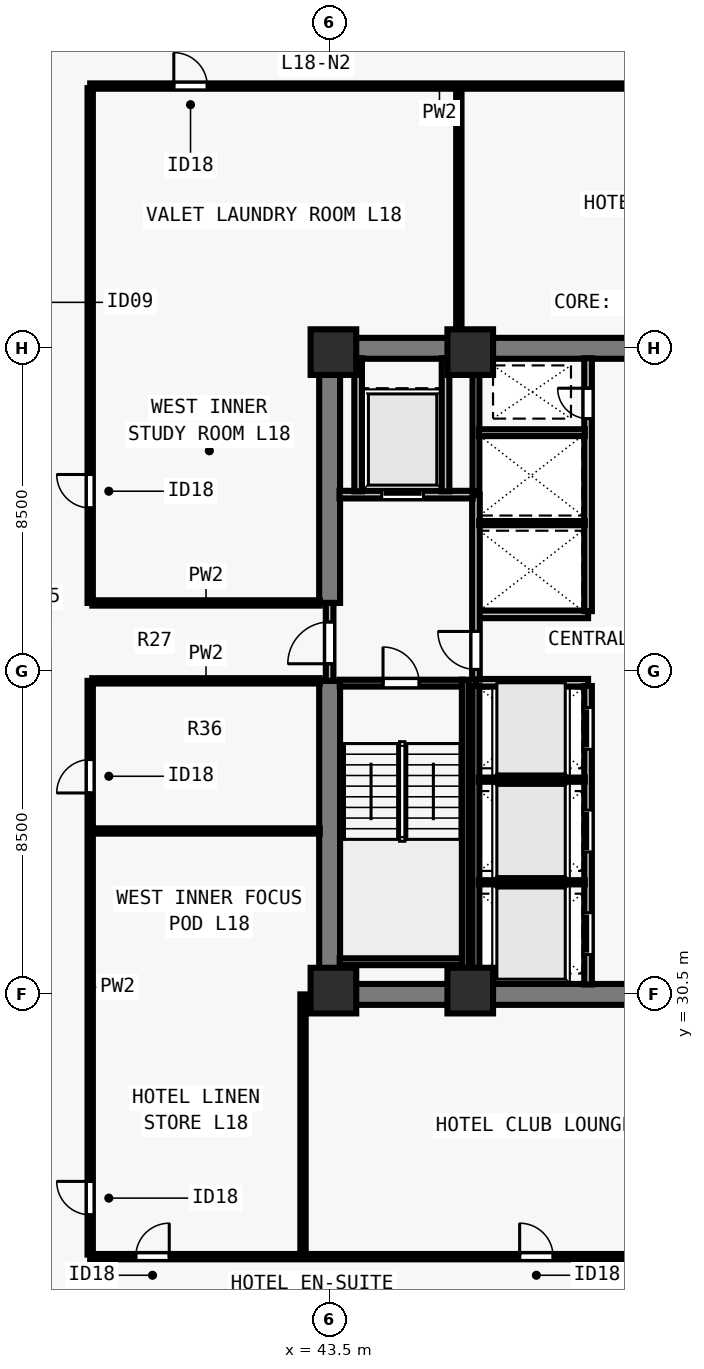
"""IFC4 building model, lengths in metres.
Left out: names, types, materials, properties, quantities, classifications, styles, units other than length and angle.
Written with IfcOpenShell. Run it as: python <this file> out.ifc"""

import sys

from ifc_helpers import new_model, si_unit, direction, frame, frame_2d, origin, origin_2d, place, context, subcontext, project, spatial, rectangle, extrude, element, fill, save


model = new_model("IFC4")
c1 = context("Model", 3, precision=1e-05, world=origin(), true_north=direction((0.0, 1.0)))
c2 = subcontext(c1, "Body", "Model", "MODEL_VIEW")
j1 = project(units=[si_unit("LENGTHUNIT", "METRE"), si_unit("PLANEANGLEUNIT", "RADIAN")], contexts=[c1])
p1 = place(None, origin())
s1 = spatial("IfcSite", under=j1, at=p1, CompositionType="ELEMENT")
p2 = place(p1, origin())
s2 = spatial("IfcBuilding", under=s1, at=p2, CompositionType="ELEMENT")
p3 = place(p2, frame((0.0, 0.0, 69.0)))
s3 = spatial("IfcBuildingStorey", under=s2, at=p3, CompositionType="ELEMENT", Elevation=69.0)
for number, where, z_axis, x_axis in (
    (1, (43.6, 30.6, 0.0), (0.0, 0.0, 1.0), (1.0, 0.0, 0.0)),
    (2, (47.2, 30.6, 0.0), (0.0, 0.0, 1.0), (1.0, 0.0, 0.0)),
    (3, (43.6, 47.4, 0.0), (0.0, 0.0, 1.0), (1.0, 0.0, 0.0)),
    (4, (47.2, 47.4, 0.0), (0.0, 0.0, 1.0), (1.0, 0.0, 0.0)),
):
    element("IfcColumn", number, at=place(p3, frame(where, z_axis=z_axis, x_axis=x_axis)), inside=s3, PredefinedType="COLUMN", context=c2, shape_type="SweptSolid", body=[
        extrude(rectangle(XDim=1.2, YDim=1.2, at=origin_2d()), origin(), (0.0, 0.0, 1.0), 3.5),
    ])
for number, where, z_axis, x_axis in (
    (5, (43.225, 30.5, 0.0), (0.0, 0.0, 1.0), (1.0, 0.0, 0.0)),
    (6, (43.225, 47.5, 0.0), (0.0, 0.0, 1.0), (1.0, 0.0, 0.0)),
):
    element("IfcWall", number, at=place(p3, frame(where, z_axis=z_axis, x_axis=x_axis)), inside=s3, PredefinedType="SHEAR", context=c2, shape_type="SweptSolid", body=[
        extrude(rectangle(XDim=17.55, YDim=0.55, at=frame_2d((8.775, 0.0))), origin(), (0.0, 0.0, 1.0), 3.28),
    ])
p4 = place(p3, frame((43.5, 30.765, 0.0), z_axis=(0.0, 0.0, 1.0), x_axis=(0.0, 1.0, 0.0)))
e7 = element("IfcWall", 7, at=p4, inside=s3, PredefinedType="SHEAR", context=c2, shape_type="SweptSolid", body=[
    extrude(rectangle(XDim=7.985, YDim=0.55, at=frame_2d((3.993, 0.0))), origin(), (0.0, 0.0, 1.0), 3.28),
])
p5 = place(p3, frame((43.5, 40.8, 0.0), z_axis=(0.0, 0.0, 1.0), x_axis=(0.0, 1.0, 0.0)))
e8 = element("IfcWall", 8, at=p5, inside=s3, PredefinedType="SHEAR", context=c2, shape_type="SweptSolid", body=[
    extrude(rectangle(XDim=6.435, YDim=0.55, at=frame_2d((3.218, 0.0))), origin(), (0.0, 0.0, 1.0), 3.28),
])
for number, where, z_axis, x_axis in (
    (9, (47.35, 38.7, 0.0), (0.0, 0.0, 1.0), (1.0, 0.0, 0.0)),
    (10, (47.35, 40.5, 0.0), (0.0, 0.0, 1.0), (1.0, 0.0, 0.0)),
):
    element("IfcWall", number, at=place(p3, frame(where, z_axis=z_axis, x_axis=x_axis)), inside=s3, PredefinedType="SOLIDWALL", context=c2, shape_type="SweptSolid", body=[
        extrude(rectangle(XDim=2.95, YDim=0.2, at=frame_2d((1.475, 0.0))), origin(), (0.0, 0.0, 1.0), 3.28),
    ])
p6 = place(p3, frame((50.3, 30.76, 0.0), z_axis=(0.0, 0.0, 1.0), x_axis=(0.0, 1.0, 0.0)))
e11 = element("IfcWall", 11, at=p6, inside=s3, PredefinedType="SOLIDWALL", context=c2, shape_type="SweptSolid", body=[
    extrude(rectangle(XDim=7.855, YDim=0.2, at=frame_2d((3.927, 0.0))), origin(), (0.0, 0.0, 1.0), 3.28),
])
p7 = place(p6, frame((0.79, 0.0, 0.0)))
e12 = element("IfcOpeningElement", 12, at=p7, cuts=e11, PredefinedType="OPENING", context=c2, shape_type="SweptSolid", body=[
    extrude(rectangle(XDim=1.1, YDim=2.2, at=frame_2d((0.55, 1.1))), frame((0.0, 0.11, 0.0), z_axis=(0.0, -1.0, 0.0), x_axis=(1.0, 0.0, 0.0)), (0.0, 0.0, 1.0), 0.22),
])
p8 = place(p6, frame((3.49, 0.0, 0.0)))
e13 = element("IfcOpeningElement", 13, at=p8, cuts=e11, PredefinedType="OPENING", context=c2, shape_type="SweptSolid", body=[
    extrude(rectangle(XDim=1.1, YDim=2.2, at=frame_2d((0.55, 1.1))), frame((0.0, 0.11, 0.0), z_axis=(0.0, -1.0, 0.0), x_axis=(1.0, 0.0, 0.0)), (0.0, 0.0, 1.0), 0.22),
])
p9 = place(p6, frame((6.19, 0.0, 0.0)))
e14 = element("IfcOpeningElement", 14, at=p9, cuts=e11, PredefinedType="OPENING", context=c2, shape_type="SweptSolid", body=[
    extrude(rectangle(XDim=1.1, YDim=2.2, at=frame_2d((0.55, 1.1))), frame((0.0, 0.11, 0.0), z_axis=(0.0, -1.0, 0.0), x_axis=(1.0, 0.0, 0.0)), (0.0, 0.0, 1.0), 0.22),
])
p10 = place(p3, frame((50.3, 40.585, 0.0), z_axis=(0.0, 0.0, 1.0), x_axis=(0.0, 1.0, 0.0)))
e15 = element("IfcWall", 15, at=p10, inside=s3, PredefinedType="SOLIDWALL", context=c2, shape_type="SweptSolid", body=[
    extrude(rectangle(XDim=6.655, YDim=0.2, at=frame_2d((3.328, 0.0))), origin(), (0.0, 0.0, 1.0), 3.28),
])
p11 = place(p10, frame((5.065, 0.0, 0.0)))
e16 = element("IfcOpeningElement", 16, at=p11, cuts=e15, PredefinedType="OPENING", context=c2, shape_type="SweptSolid", body=[
    extrude(rectangle(XDim=0.8, YDim=2.08, at=frame_2d((0.4, 1.04))), frame((0.0, 0.11, 0.0), z_axis=(0.0, -1.0, 0.0), x_axis=(1.0, 0.0, 0.0)), (0.0, 0.0, 1.0), 0.22),
])
p12 = place(p3, frame((43.5, 38.75, 0.0), z_axis=(0.0, 0.0, 1.0), x_axis=(0.0, 1.0, 0.0)))
e17 = element("IfcWall", 17, at=p12, inside=s3, PredefinedType="SOLIDWALL", context=c2, shape_type="SweptSolid", body=[
    extrude(rectangle(XDim=2.05, YDim=0.2, at=frame_2d((1.025, 0.0))), origin(), (0.0, 0.0, 1.0), 3.28),
])
p13 = place(p12, frame((0.45, 0.0, 0.0)))
e18 = element("IfcOpeningElement", 18, at=p13, cuts=e17, PredefinedType="OPENING", context=c2, shape_type="SweptSolid", body=[
    extrude(rectangle(XDim=1.1, YDim=2.15, at=frame_2d((0.55, 1.075))), frame((0.0, 0.11, 0.0), z_axis=(0.0, -1.0, 0.0), x_axis=(1.0, 0.0, 0.0)), (0.0, 0.0, 1.0), 0.22),
])
p14 = place(p3, frame((47.35, 38.785, 0.0), z_axis=(0.0, 0.0, 1.0), x_axis=(0.0, 1.0, 0.0)))
e19 = element("IfcWall", 19, at=p14, inside=s3, PredefinedType="SOLIDWALL", context=c2, shape_type="SweptSolid", body=[
    extrude(rectangle(XDim=4.865, YDim=0.2, at=frame_2d((2.433, 0.0))), origin(), (0.0, 0.0, 1.0), 3.28),
])
p15 = place(p14, frame((0.265, 0.0, 0.0)))
e20 = element("IfcOpeningElement", 20, at=p15, cuts=e19, PredefinedType="OPENING", context=c2, shape_type="SweptSolid", body=[
    extrude(rectangle(XDim=1.0, YDim=2.15, at=frame_2d((0.5, 1.075))), frame((0.0, 0.11, 0.0), z_axis=(0.0, -1.0, 0.0), x_axis=(1.0, 0.0, 0.0)), (0.0, 0.0, 1.0), 0.22),
])
p16 = place(p3, frame((43.76, 43.65, 0.0), z_axis=(0.0, 0.0, 1.0), x_axis=(1.0, 0.0, 0.0)))
e21 = element("IfcWall", 21, at=p16, inside=s3, PredefinedType="SOLIDWALL", context=c2, shape_type="SweptSolid", body=[
    extrude(rectangle(XDim=3.505, YDim=0.2, at=frame_2d((1.752, 0.0))), origin(), (0.0, 0.0, 1.0), 3.28),
])
p17 = place(p16, frame((1.11, 0.0, 0.0)))
e22 = element("IfcOpeningElement", 22, at=p17, cuts=e21, PredefinedType="OPENING", context=c2, shape_type="SweptSolid", body=[
    extrude(rectangle(XDim=1.1, YDim=2.2, at=frame_2d((0.55, 1.1))), frame((0.0, 0.11, 0.0), z_axis=(0.0, -1.0, 0.0), x_axis=(1.0, 0.0, 0.0)), (0.0, 0.0, 1.0), 0.22),
])
for number, where, z_axis, x_axis in (
    (23, (46.55, 43.735, 0.0), (0.0, 0.0, 1.0), (0.0, 1.0, 0.0)),
    (24, (44.25, 43.735, 0.0), (0.0, 0.0, 1.0), (0.0, 1.0, 0.0)),
):
    element("IfcWall", number, at=place(p3, frame(where, z_axis=z_axis, x_axis=x_axis)), inside=s3, PredefinedType="SOLIDWALL", context=c2, shape_type="SweptSolid", body=[
        extrude(rectangle(XDim=3.505, YDim=0.2, at=frame_2d((1.752, 0.0))), origin(), (0.0, 0.0, 1.0), 3.28),
    ])
p18 = place(p3, frame((47.35, 30.76, 0.0), z_axis=(0.0, 0.0, 1.0), x_axis=(0.0, 1.0, 0.0)))
e25 = element("IfcWall", 25, at=p18, inside=s3, PredefinedType="SOLIDWALL", context=c2, shape_type="SweptSolid", body=[
    extrude(rectangle(XDim=7.855, YDim=0.18, at=frame_2d((3.927, 0.0))), origin(), (0.0, 0.0, 1.0), 3.28),
])
for number, where, z_axis, x_axis in (
    (26, (47.425, 33.45, 0.0), (0.0, 0.0, 1.0), (1.0, 0.0, 0.0)),
    (27, (47.425, 36.15, 0.0), (0.0, 0.0, 1.0), (1.0, 0.0, 0.0)),
):
    element("IfcWall", number, at=place(p3, frame(where, z_axis=z_axis, x_axis=x_axis)), inside=s3, PredefinedType="PARTITIONING", context=c2, shape_type="SweptSolid", body=[
        extrude(rectangle(XDim=2.79, YDim=0.11, at=frame_2d((1.395, 0.0))), origin(), (0.0, 0.0, 1.0), 3.28),
    ])
p19 = place(p3, frame((47.35, 43.735, 0.0), z_axis=(0.0, 0.0, 1.0), x_axis=(0.0, 1.0, 0.0)))
e28 = element("IfcWall", 28, at=p19, inside=s3, PredefinedType="SOLIDWALL", context=c2, shape_type="SweptSolid", body=[
    extrude(rectangle(XDim=3.505, YDim=0.18, at=frame_2d((1.752, 0.0))), origin(), (0.0, 0.0, 1.0), 3.28),
])
p20 = place(p3, frame((47.435, 42.9, 0.0), z_axis=(0.0, 0.0, 1.0), x_axis=(1.0, 0.0, 0.0)))
e29 = element("IfcWall", 29, at=p20, inside=s3, PredefinedType="PARTITIONING", context=c2, shape_type="SweptSolid", body=[
    extrude(rectangle(XDim=2.78, YDim=0.11, at=frame_2d((1.39, 0.0))), origin(), (0.0, 0.0, 1.0), 3.28),
])
p21 = place(p3, frame((47.425, 45.28, 0.0), z_axis=(0.0, 0.0, 1.0), x_axis=(1.0, 0.0, 0.0)))
e30 = element("IfcWall", 30, at=p21, inside=s3, PredefinedType="SOLIDWALL", context=c2, shape_type="SweptSolid", body=[
    extrude(rectangle(XDim=2.79, YDim=0.18, at=frame_2d((1.395, 0.0))), origin(), (0.0, 0.0, 1.0), 3.28),
])
p22 = place(p3, frame((37.2, 23.6, 0.0), z_axis=(0.0, 0.0, 1.0), x_axis=(1.0, 0.0, 0.0)))
e31 = element("IfcWall", 31, at=p22, inside=s3, PredefinedType="PARTITIONING", context=c2, shape_type="SweptSolid", body=[
    extrude(rectangle(XDim=29.6, YDim=0.14, at=frame_2d((14.8, 0.0))), origin(), (0.0, 0.0, 1.0), 3.28),
])
p23 = place(p22, frame((1.2, 0.0, 0.0)))
e32 = element("IfcOpeningElement", 32, at=p23, cuts=e31, PredefinedType="OPENING", context=c2, shape_type="SweptSolid", body=[
    extrude(rectangle(XDim=0.88, YDim=2.1, at=frame_2d((0.44, 1.05))), frame((0.0, 0.08, 0.0), z_axis=(0.0, -1.0, 0.0), x_axis=(1.0, 0.0, 0.0)), (0.0, 0.0, 1.0), 0.16),
])
p24 = place(p22, frame((11.3, 0.0, 0.0)))
e33 = element("IfcOpeningElement", 33, at=p24, cuts=e31, PredefinedType="OPENING", context=c2, shape_type="SweptSolid", body=[
    extrude(rectangle(XDim=0.88, YDim=2.1, at=frame_2d((0.44, 1.05))), frame((0.0, 0.08, 0.0), z_axis=(0.0, -1.0, 0.0), x_axis=(1.0, 0.0, 0.0)), (0.0, 0.0, 1.0), 0.16),
])
p25 = place(p22, frame((21.8, 0.0, 0.0)))
e34 = element("IfcOpeningElement", 34, at=p25, cuts=e31, PredefinedType="OPENING", context=c2, shape_type="SweptSolid", body=[
    extrude(rectangle(XDim=0.88, YDim=2.1, at=frame_2d((0.44, 1.05))), frame((0.0, 0.08, 0.0), z_axis=(0.0, -1.0, 0.0), x_axis=(1.0, 0.0, 0.0)), (0.0, 0.0, 1.0), 0.16),
])
p26 = place(p3, frame((37.2, 54.4, 0.0), z_axis=(0.0, 0.0, 1.0), x_axis=(1.0, 0.0, 0.0)))
e35 = element("IfcWall", 35, at=p26, inside=s3, PredefinedType="PARTITIONING", context=c2, shape_type="SweptSolid", body=[
    extrude(rectangle(XDim=29.6, YDim=0.14, at=frame_2d((14.8, 0.0))), origin(), (0.0, 0.0, 1.0), 3.28),
])
p27 = place(p26, frame((2.2, 0.0, 0.0)))
e36 = element("IfcOpeningElement", 36, at=p27, cuts=e35, PredefinedType="OPENING", context=c2, shape_type="SweptSolid", body=[
    extrude(rectangle(XDim=0.88, YDim=2.1, at=frame_2d((0.44, 1.05))), frame((0.0, 0.08, 0.0), z_axis=(0.0, -1.0, 0.0), x_axis=(1.0, 0.0, 0.0)), (0.0, 0.0, 1.0), 0.16),
])
p28 = place(p26, frame((15.3, 0.0, 0.0)))
e37 = element("IfcOpeningElement", 37, at=p28, cuts=e35, PredefinedType="OPENING", context=c2, shape_type="SweptSolid", body=[
    extrude(rectangle(XDim=0.88, YDim=2.1, at=frame_2d((0.44, 1.05))), frame((0.0, 0.08, 0.0), z_axis=(0.0, -1.0, 0.0), x_axis=(1.0, 0.0, 0.0)), (0.0, 0.0, 1.0), 0.16),
])
p29 = place(p26, frame((24.8, 0.0, 0.0)))
e38 = element("IfcOpeningElement", 38, at=p29, cuts=e35, PredefinedType="OPENING", context=c2, shape_type="SweptSolid", body=[
    extrude(rectangle(XDim=0.88, YDim=2.1, at=frame_2d((0.44, 1.05))), frame((0.0, 0.08, 0.0), z_axis=(0.0, -1.0, 0.0), x_axis=(1.0, 0.0, 0.0)), (0.0, 0.0, 1.0), 0.16),
])
p30 = place(p3, frame((37.2, 23.655, 0.0), z_axis=(0.0, 0.0, 1.0), x_axis=(0.0, 1.0, 0.0)))
e39 = element("IfcWall", 39, at=p30, inside=s3, PredefinedType="PARTITIONING", context=c2, shape_type="SweptSolid", body=[
    extrude(rectangle(XDim=15.095, YDim=0.14, at=frame_2d((7.547, 0.0))), origin(), (0.0, 0.0, 1.0), 3.28),
])
p31 = place(p30, frame((1.045, 0.0, 0.0)))
e40 = element("IfcOpeningElement", 40, at=p31, cuts=e39, PredefinedType="OPENING", context=c2, shape_type="SweptSolid", body=[
    extrude(rectangle(XDim=0.88, YDim=2.1, at=frame_2d((0.44, 1.05))), frame((0.0, 0.08, 0.0), z_axis=(0.0, -1.0, 0.0), x_axis=(1.0, 0.0, 0.0)), (0.0, 0.0, 1.0), 0.16),
])
p32 = place(p30, frame((12.145, 0.0, 0.0)))
e41 = element("IfcOpeningElement", 41, at=p32, cuts=e39, PredefinedType="OPENING", context=c2, shape_type="SweptSolid", body=[
    extrude(rectangle(XDim=0.88, YDim=2.1, at=frame_2d((0.44, 1.05))), frame((0.0, 0.08, 0.0), z_axis=(0.0, -1.0, 0.0), x_axis=(1.0, 0.0, 0.0)), (0.0, 0.0, 1.0), 0.16),
])
p33 = place(p3, frame((37.2, 40.8, 0.0), z_axis=(0.0, 0.0, 1.0), x_axis=(0.0, 1.0, 0.0)))
e42 = element("IfcWall", 42, at=p33, inside=s3, PredefinedType="PARTITIONING", context=c2, shape_type="SweptSolid", body=[
    extrude(rectangle(XDim=13.545, YDim=0.14, at=frame_2d((6.772, 0.0))), origin(), (0.0, 0.0, 1.0), 3.28),
])
p34 = place(p33, frame((2.5, 0.0, 0.0)))
e43 = element("IfcOpeningElement", 43, at=p34, cuts=e42, PredefinedType="OPENING", context=c2, shape_type="SweptSolid", body=[
    extrude(rectangle(XDim=0.88, YDim=2.1, at=frame_2d((0.44, 1.05))), frame((0.0, 0.08, 0.0), z_axis=(0.0, -1.0, 0.0), x_axis=(1.0, 0.0, 0.0)), (0.0, 0.0, 1.0), 0.16),
])
for number, where, z_axis, x_axis in (
    (44, (37.255, 38.75, 0.0), (0.0, 0.0, 1.0), (1.0, 0.0, 0.0)),
    (45, (37.255, 40.8, 0.0), (0.0, 0.0, 1.0), (1.0, 0.0, 0.0)),
):
    element("IfcWall", number, at=place(p3, frame(where, z_axis=z_axis, x_axis=x_axis)), inside=s3, PredefinedType="PARTITIONING", context=c2, shape_type="SweptSolid", body=[
        extrude(rectangle(XDim=5.985, YDim=0.14, at=frame_2d((2.993, 0.0))), origin(), (0.0, 0.0, 1.0), 3.28),
    ])
p35 = place(p3, frame((42.8, 23.655, 0.0), z_axis=(0.0, 0.0, 1.0), x_axis=(0.0, 1.0, 0.0)))
e46 = element("IfcWall", 46, at=p35, inside=s3, PredefinedType="PARTITIONING", context=c2, shape_type="SweptSolid", body=[
    extrude(rectangle(XDim=6.845, YDim=0.14, at=frame_2d((3.422, 0.0))), origin(), (0.0, 0.0, 1.0), 2.439),
])
p36 = place(p3, frame((46.9, 47.76, 0.0), z_axis=(0.0, 0.0, 1.0), x_axis=(0.0, 1.0, 0.0)))
e47 = element("IfcWall", 47, at=p36, inside=s3, PredefinedType="PARTITIONING", context=c2, shape_type="SweptSolid", body=[
    extrude(rectangle(XDim=6.585, YDim=0.14, at=frame_2d((3.292, 0.0))), origin(), (0.0, 0.0, 1.0), 3.28),
])
p37 = place(p3, frame((37.255, 34.8, 0.0), z_axis=(0.0, 0.0, 1.0), x_axis=(1.0, 0.0, 0.0)))
e48 = element("IfcWall", 48, at=p37, inside=s3, PredefinedType="PARTITIONING", context=c2, shape_type="SweptSolid", body=[
    extrude(rectangle(XDim=5.985, YDim=0.14, at=frame_2d((2.993, 0.0))), origin(), (0.0, 0.0, 1.0), 3.28),
])
p38 = place(p3, frame((43.765, 38.69, 0.0), z_axis=(0.0, 0.0, 1.0), x_axis=(1.0, 0.0, 0.0)))
e49 = element("IfcWall", 49, at=p38, inside=s3, PredefinedType="SOLIDWALL", context=c2, shape_type="SweptSolid", body=[
    extrude(rectangle(XDim=3.23, YDim=0.18, at=frame_2d((1.615, 0.0))), origin(), (0.0, 0.0, 1.0), 3.28),
])
p39 = place(p38, frame((1.14, 0.0, 0.0)))
e50 = element("IfcOpeningElement", 50, at=p39, cuts=e49, PredefinedType="OPENING", context=c2, shape_type="SweptSolid", body=[
    extrude(rectangle(XDim=0.95, YDim=2.15, at=frame_2d((0.475, 1.075))), frame((0.0, 0.1, 0.0), z_axis=(0.0, -1.0, 0.0), x_axis=(1.0, 0.0, 0.0)), (0.0, 0.0, 1.0), 0.2),
])
p40 = place(p3, frame((43.765, 31.36, 0.0), z_axis=(0.0, 0.0, 1.0), x_axis=(1.0, 0.0, 0.0)))
e51 = element("IfcWall", 51, at=p40, inside=s3, PredefinedType="SOLIDWALL", context=c2, shape_type="SweptSolid", body=[
    extrude(rectangle(XDim=3.23, YDim=0.18, at=frame_2d((1.615, 0.0))), origin(), (0.0, 0.0, 1.0), 3.28),
])
p41 = place(p3, frame((47.07, 38.78, 0.0), z_axis=(0.0, 0.0, 1.0), x_axis=(0.0, -1.0, 0.0)))
e52 = element("IfcWall", 52, at=p41, inside=s3, PredefinedType="SOLIDWALL", context=c2, shape_type="SweptSolid", body=[
    extrude(rectangle(XDim=8.017, YDim=0.18, at=frame_2d((4.009, 0.0))), origin(), (0.0, 0.0, 1.0), 3.28),
])
p42 = place(p13, origin())
e53 = element("IfcDoor", 53, at=p42, inside=s3, OperationType="SINGLE_SWING_LEFT", PredefinedType="DOOR", context=c2, shape_type="SweptSolid", body=[
    extrude(rectangle(XDim=1.1, YDim=2.15, at=frame_2d((0.55, 1.075))), frame((0.0, 0.025, 0.0), z_axis=(0.0, -1.0, 0.0), x_axis=(1.0, 0.0, 0.0)), (0.0, 0.0, 1.0), 0.05),
])
fill(e18, e53)
p43 = place(p15, origin())
e54 = element("IfcDoor", 54, at=p43, inside=s3, OperationType="SINGLE_SWING_RIGHT", PredefinedType="DOOR", context=c2, shape_type="SweptSolid", body=[
    extrude(rectangle(XDim=1.0, YDim=2.15, at=frame_2d((0.5, 1.075))), frame((0.0, 0.025, 0.0), z_axis=(0.0, -1.0, 0.0), x_axis=(1.0, 0.0, 0.0)), (0.0, 0.0, 1.0), 0.05),
])
fill(e20, e54)
p44 = place(p17, origin())
e55 = element("IfcDoor", 55, at=p44, inside=s3, OperationType="SLIDING_TO_LEFT", PredefinedType="DOOR", context=c2, shape_type="SweptSolid", body=[
    extrude(rectangle(XDim=1.1, YDim=2.2, at=frame_2d((0.55, 1.1))), frame((0.0, 0.025, 0.0), z_axis=(0.0, -1.0, 0.0), x_axis=(1.0, 0.0, 0.0)), (0.0, 0.0, 1.0), 0.05),
])
fill(e22, e55)
p45 = place(p7, origin())
e56 = element("IfcDoor", 56, at=p45, inside=s3, OperationType="SLIDING_TO_LEFT", PredefinedType="DOOR", context=c2, shape_type="SweptSolid", body=[
    extrude(rectangle(XDim=1.1, YDim=2.2, at=frame_2d((0.55, 1.1))), frame((0.0, 0.025, 0.0), z_axis=(0.0, -1.0, 0.0), x_axis=(1.0, 0.0, 0.0)), (0.0, 0.0, 1.0), 0.05),
])
fill(e12, e56)
p46 = place(p8, origin())
e57 = element("IfcDoor", 57, at=p46, inside=s3, OperationType="SLIDING_TO_LEFT", PredefinedType="DOOR", context=c2, shape_type="SweptSolid", body=[
    extrude(rectangle(XDim=1.1, YDim=2.2, at=frame_2d((0.55, 1.1))), frame((0.0, 0.025, 0.0), z_axis=(0.0, -1.0, 0.0), x_axis=(1.0, 0.0, 0.0)), (0.0, 0.0, 1.0), 0.05),
])
fill(e13, e57)
p47 = place(p9, origin())
e58 = element("IfcDoor", 58, at=p47, inside=s3, OperationType="SLIDING_TO_LEFT", PredefinedType="DOOR", context=c2, shape_type="SweptSolid", body=[
    extrude(rectangle(XDim=1.1, YDim=2.2, at=frame_2d((0.55, 1.1))), frame((0.0, 0.025, 0.0), z_axis=(0.0, -1.0, 0.0), x_axis=(1.0, 0.0, 0.0)), (0.0, 0.0, 1.0), 0.05),
])
fill(e14, e58)
p48 = place(p11, origin())
e59 = element("IfcDoor", 59, at=p48, inside=s3, OperationType="SINGLE_SWING_RIGHT", PredefinedType="DOOR", context=c2, shape_type="SweptSolid", body=[
    extrude(rectangle(XDim=0.8, YDim=2.08, at=frame_2d((0.4, 1.04))), frame((0.0, 0.025, 0.0), z_axis=(0.0, -1.0, 0.0), x_axis=(1.0, 0.0, 0.0)), (0.0, 0.0, 1.0), 0.05),
])
fill(e16, e59)
p49 = place(p23, origin())
e60 = element("IfcDoor", 60, at=p49, inside=s3, OperationType="SINGLE_SWING_RIGHT", PredefinedType="DOOR", context=c2, shape_type="SweptSolid", body=[
    extrude(rectangle(XDim=0.88, YDim=2.1, at=frame_2d((0.44, 1.05))), frame((0.0, 0.025, 0.0), z_axis=(0.0, -1.0, 0.0), x_axis=(1.0, 0.0, 0.0)), (0.0, 0.0, 1.0), 0.05),
])
fill(e32, e60)
p50 = place(p24, origin())
e61 = element("IfcDoor", 61, at=p50, inside=s3, OperationType="SINGLE_SWING_LEFT", PredefinedType="DOOR", context=c2, shape_type="SweptSolid", body=[
    extrude(rectangle(XDim=0.88, YDim=2.1, at=frame_2d((0.44, 1.05))), frame((0.0, 0.025, 0.0), z_axis=(0.0, -1.0, 0.0), x_axis=(1.0, 0.0, 0.0)), (0.0, 0.0, 1.0), 0.05),
])
fill(e33, e61)
p51 = place(p27, origin())
e62 = element("IfcDoor", 62, at=p51, inside=s3, OperationType="SINGLE_SWING_LEFT", PredefinedType="DOOR", context=c2, shape_type="SweptSolid", body=[
    extrude(rectangle(XDim=0.88, YDim=2.1, at=frame_2d((0.44, 1.05))), frame((0.0, 0.025, 0.0), z_axis=(0.0, -1.0, 0.0), x_axis=(1.0, 0.0, 0.0)), (0.0, 0.0, 1.0), 0.05),
])
fill(e36, e62)
p52 = place(p31, origin())
e63 = element("IfcDoor", 63, at=p52, inside=s3, OperationType="SINGLE_SWING_RIGHT", PredefinedType="DOOR", context=c2, shape_type="SweptSolid", body=[
    extrude(rectangle(XDim=0.88, YDim=2.1, at=frame_2d((0.44, 1.05))), frame((0.0, 0.025, 0.0), z_axis=(0.0, -1.0, 0.0), x_axis=(1.0, 0.0, 0.0)), (0.0, 0.0, 1.0), 0.05),
])
fill(e40, e63)
p53 = place(p32, origin())
e64 = element("IfcDoor", 64, at=p53, inside=s3, OperationType="SINGLE_SWING_LEFT", PredefinedType="DOOR", context=c2, shape_type="SweptSolid", body=[
    extrude(rectangle(XDim=0.88, YDim=2.1, at=frame_2d((0.44, 1.05))), frame((0.0, 0.025, 0.0), z_axis=(0.0, -1.0, 0.0), x_axis=(1.0, 0.0, 0.0)), (0.0, 0.0, 1.0), 0.05),
])
fill(e41, e64)
p54 = place(p34, origin())
e65 = element("IfcDoor", 65, at=p54, inside=s3, OperationType="SINGLE_SWING_RIGHT", PredefinedType="DOOR", context=c2, shape_type="SweptSolid", body=[
    extrude(rectangle(XDim=0.88, YDim=2.1, at=frame_2d((0.44, 1.05))), frame((0.0, 0.025, 0.0), z_axis=(0.0, -1.0, 0.0), x_axis=(1.0, 0.0, 0.0)), (0.0, 0.0, 1.0), 0.05),
])
fill(e43, e65)
p55 = place(p39, origin())
e66 = element("IfcDoor", 66, at=p55, inside=s3, OperationType="SINGLE_SWING_LEFT", PredefinedType="DOOR", context=c2, shape_type="SweptSolid", body=[
    extrude(rectangle(XDim=0.95, YDim=2.15, at=frame_2d((0.475, 1.075))), frame((0.0, 0.025, 0.0), z_axis=(0.0, -1.0, 0.0), x_axis=(1.0, 0.0, 0.0)), (0.0, 0.0, 1.0), 0.05),
])
fill(e50, e66)
save(model, sys.argv[1])
